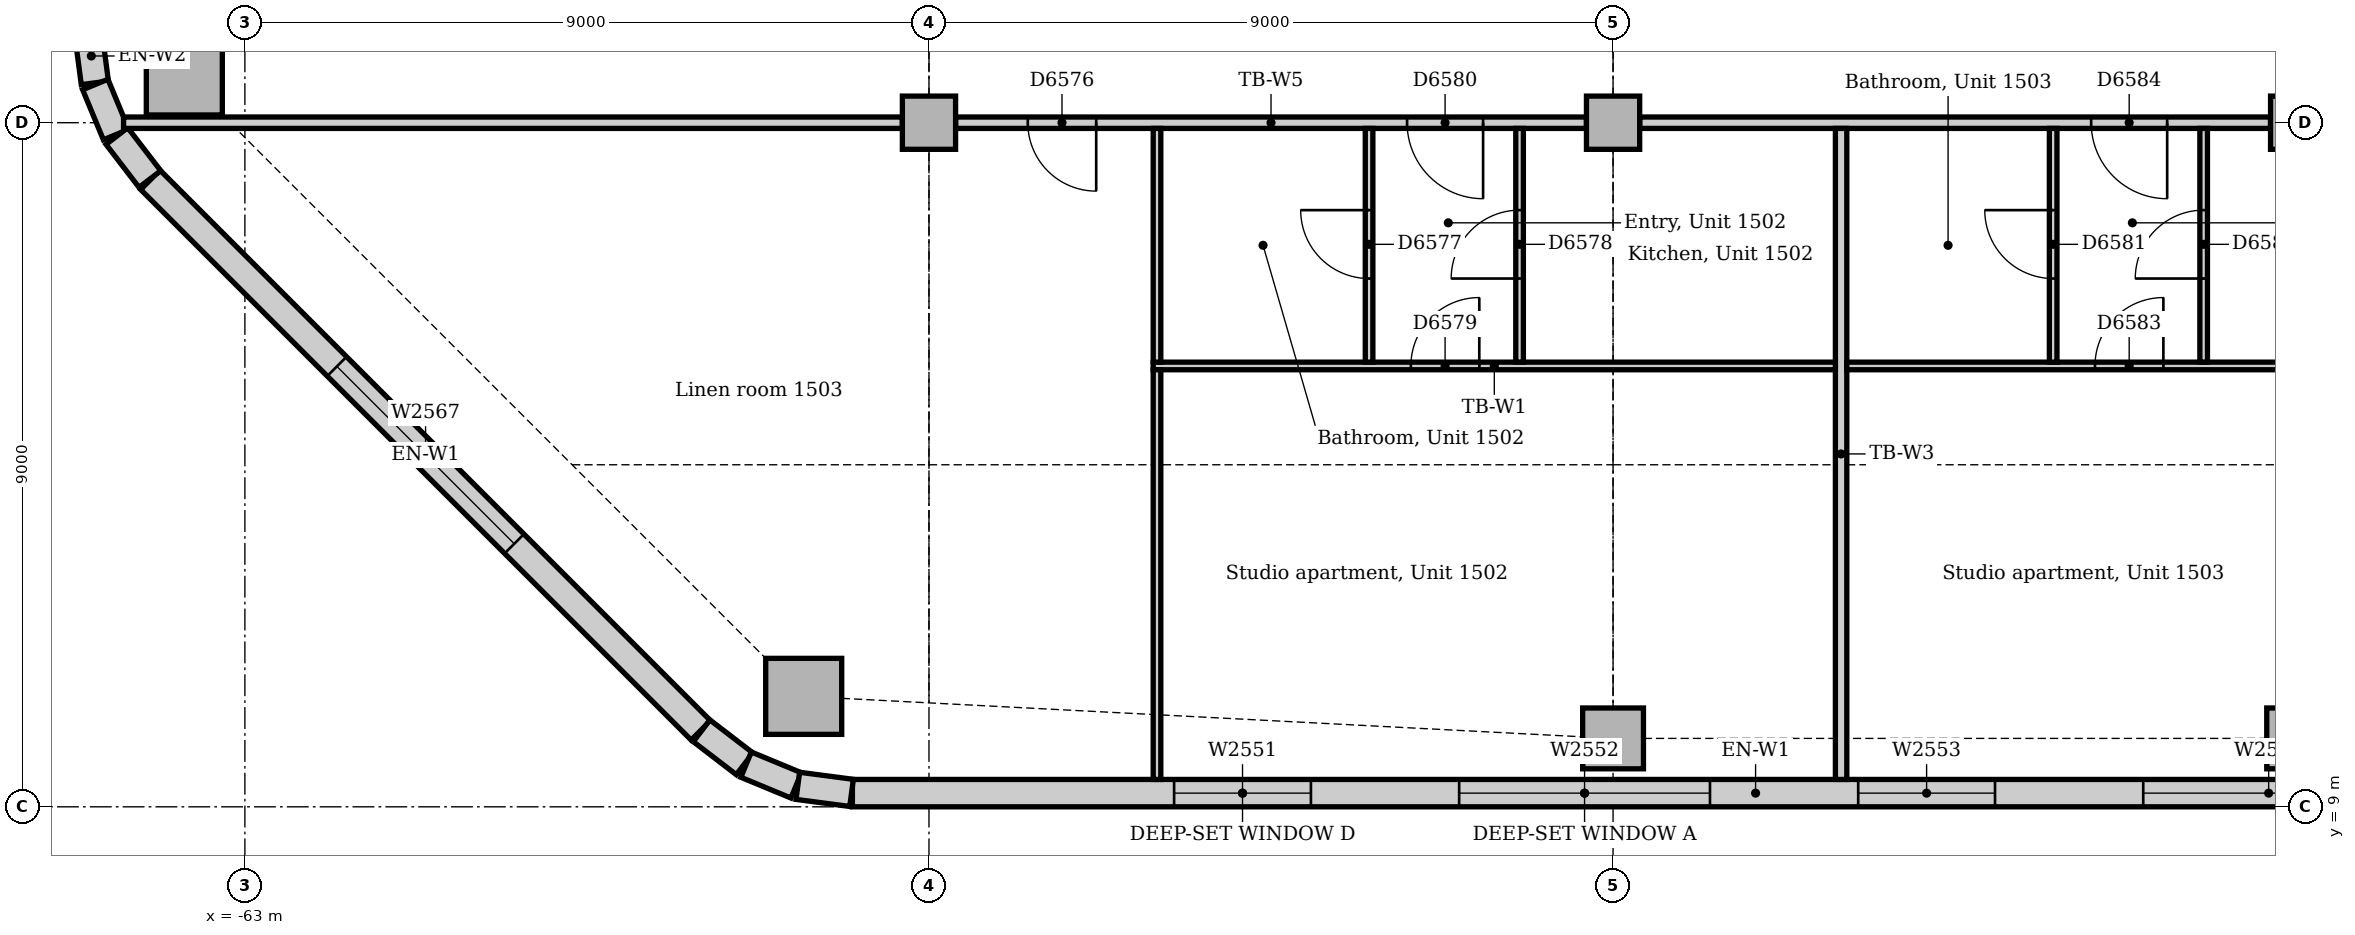
"""IFC4 building model, lengths in metres.
Left out: names, types, materials, properties, quantities, classifications, styles, units other than length and angle.
Written with IfcOpenShell. Run it as: python <this file> out.ifc"""

import sys

from ifc_helpers import new_model, si_unit, direction, frame, frame_2d, origin, origin_2d, place, context, subcontext, project, spatial, rectangle, extrude, element, fill, save


model = new_model("IFC4")
c1 = context("Model", 3, precision=1e-05, world=origin(), true_north=direction((0.0, 1.0)))
c2 = subcontext(c1, "Body", "Model", "MODEL_VIEW")
j1 = project(units=[si_unit("LENGTHUNIT", "METRE"), si_unit("PLANEANGLEUNIT", "RADIAN")], contexts=[c1])
p1 = place(None, origin())
s1 = spatial("IfcSite", under=j1, at=p1, CompositionType="ELEMENT")
p2 = place(p1, origin())
s2 = spatial("IfcBuilding", under=s1, at=p2, CompositionType="ELEMENT")
p3 = place(p2, frame((0.0, 0.0, 67.0)))
s3 = spatial("IfcBuildingStorey", under=s2, at=p3, CompositionType="ELEMENT", Elevation=67.0)
for number, where, z_axis, x_axis in (
    (1, (-55.648, 10.453, 0.0), (0.0, 0.0, 1.0), (1.0, 0.0, 0.0)),
    (2, (-63.797, 18.602, 0.0), (0.0, 0.0, 1.0), (1.0, 0.0, 0.0)),
):
    element("IfcColumn", number, at=place(p3, frame(where, z_axis=z_axis, x_axis=x_axis)), inside=s3, PredefinedType="COLUMN", context=c2, shape_type="SweptSolid", body=[
        extrude(rectangle(XDim=1.0, YDim=1.0, at=origin_2d()), origin(), (0.0, 0.0, 1.0), 3.85),
    ])
for number, where, z_axis, x_axis in (
    (3, (-45.0, 9.9, 0.0), (0.0, 0.0, 1.0), (1.0, 0.0, 0.0)),
    (4, (-36.0, 9.9, 0.0), (0.0, 0.0, 1.0), (1.0, 0.0, 0.0)),
):
    element("IfcColumn", number, at=place(p3, frame(where, z_axis=z_axis, x_axis=x_axis)), inside=s3, PredefinedType="COLUMN", context=c2, shape_type="SweptSolid", body=[
        extrude(rectangle(XDim=0.8, YDim=0.8, at=origin_2d()), origin(), (0.0, 0.0, 1.0), 3.85),
    ])
for number, where, z_axis, x_axis in (
    (5, (-54.0, 18.0, 0.0), (0.0, 0.0, 1.0), (1.0, 0.0, 0.0)),
    (6, (-45.0, 18.0, 0.0), (0.0, 0.0, 1.0), (1.0, 0.0, 0.0)),
    (7, (-36.0, 18.0, 0.0), (0.0, 0.0, 1.0), (1.0, 0.0, 0.0)),
):
    element("IfcColumn", number, at=place(p3, frame(where, z_axis=z_axis, x_axis=x_axis)), inside=s3, PredefinedType="COLUMN", context=c2, shape_type="SweptSolid", body=[
        extrude(rectangle(XDim=0.7, YDim=0.7, at=origin_2d()), origin(), (0.0, 0.0, 1.0), 3.85),
    ])
p4 = place(p3, frame((-55.007, 9.18, 0.0), z_axis=(0.0, 0.0, 1.0), x_axis=(1.0, 0.0, 0.0)))
e8 = element("IfcWall", 8, at=p4, inside=s3, PredefinedType="STANDARD", context=c2, shape_type="SweptSolid", body=[
    extrude(rectangle(XDim=23.765, YDim=0.36, at=frame_2d((11.882, 0.0))), origin(), (0.0, 0.0, 1.0), 3.85),
])
p5 = place(p4, frame((4.232, 0.0, 0.9)))
e9 = element("IfcOpeningElement", 9, at=p5, cuts=e8, PredefinedType="OPENING", context=c2, shape_type="SweptSolid", body=[
    extrude(rectangle(XDim=1.8, YDim=1.6, at=frame_2d((0.9, 0.8))), frame((0.0, 0.19, 0.0), z_axis=(0.0, -1.0, 0.0), x_axis=(1.0, 0.0, 0.0)), (0.0, 0.0, 1.0), 0.38),
])
p6 = place(p4, frame((7.982, 0.0, 0.9)))
e10 = element("IfcOpeningElement", 10, at=p6, cuts=e8, PredefinedType="OPENING", context=c2, shape_type="SweptSolid", body=[
    extrude(rectangle(XDim=3.3, YDim=1.6, at=frame_2d((1.65, 0.8))), frame((0.0, 0.19, 0.0), z_axis=(0.0, -1.0, 0.0), x_axis=(1.0, 0.0, 0.0)), (0.0, 0.0, 1.0), 0.38),
])
p7 = place(p4, frame((13.232, 0.0, 0.9)))
e11 = element("IfcOpeningElement", 11, at=p7, cuts=e8, PredefinedType="OPENING", context=c2, shape_type="SweptSolid", body=[
    extrude(rectangle(XDim=1.8, YDim=1.6, at=frame_2d((0.9, 0.8))), frame((0.0, 0.19, 0.0), z_axis=(0.0, -1.0, 0.0), x_axis=(1.0, 0.0, 0.0)), (0.0, 0.0, 1.0), 0.38),
])
p8 = place(p4, frame((16.982, 0.0, 0.9)))
e12 = element("IfcOpeningElement", 12, at=p8, cuts=e8, PredefinedType="OPENING", context=c2, shape_type="SweptSolid", body=[
    extrude(rectangle(XDim=3.3, YDim=1.6, at=frame_2d((1.65, 0.8))), frame((0.0, 0.19, 0.0), z_axis=(0.0, -1.0, 0.0), x_axis=(1.0, 0.0, 0.0)), (0.0, 0.0, 1.0), 0.38),
])
p9 = place(p3, frame((-64.244, 17.249, 0.0), z_axis=(0.0, 0.0, 1.0), x_axis=(0.707106781187, -0.707106781187, 0.0)))
e13 = element("IfcWall", 13, at=p9, inside=s3, PredefinedType="STANDARD", context=c2, shape_type="SweptSolid", body=[
    extrude(rectangle(XDim=10.243, YDim=0.36, at=frame_2d((5.121, 0.0))), origin(), (0.0, 0.0, 1.0), 3.85),
])
p10 = place(p9, frame((3.471, 0.0, 0.9)))
e14 = element("IfcOpeningElement", 14, at=p10, cuts=e13, PredefinedType="OPENING", context=c2, shape_type="SweptSolid", body=[
    extrude(rectangle(XDim=3.3, YDim=1.6, at=frame_2d((1.65, 0.8))), frame((0.0, 0.19, 0.0), z_axis=(0.0, -1.0, 0.0), x_axis=(1.0, 0.0, 0.0)), (0.0, 0.0, 1.0), 0.38),
])
for number, where, z_axis, x_axis in (
    (15, (-65.067, 19.231, 0.0), (0.0, 0.0, 1.0), (0.131, -0.991, 0.0)),
    (16, (-64.968, 18.503, 0.0), (0.0, 0.0, 1.0), (0.383, -0.924, 0.0)),
):
    element("IfcWall", number, at=place(p3, frame(where, z_axis=z_axis, x_axis=x_axis)), inside=s3, PredefinedType="STANDARD", context=c2, shape_type="SweptSolid", body=[
        extrude(rectangle(XDim=0.713, YDim=0.36, at=frame_2d((0.356, 0.0))), origin(), (0.0, 0.0, 1.0), 3.85),
    ])
for number, where, z_axis, x_axis in (
    (17, (-64.684, 17.825, 0.0), (0.0, 0.0, 1.0), (0.609, -0.793, 0.0)),
    (18, (-56.991, 10.0, 0.0), (0.0, 0.0, 1.0), (0.793, -0.609, 0.0)),
):
    element("IfcWall", number, at=place(p3, frame(where, z_axis=z_axis, x_axis=x_axis)), inside=s3, PredefinedType="STANDARD", context=c2, shape_type="SweptSolid", body=[
        extrude(rectangle(XDim=0.713, YDim=0.36, at=frame_2d((0.357, 0.0))), origin(), (0.0, 0.0, 1.0), 3.85),
    ])
for number, where, z_axis, x_axis in (
    (19, (-56.406, 9.555, 0.0), (0.0, 0.0, 1.0), (0.924, -0.383, 0.0)),
    (20, (-55.726, 9.276, 0.0), (0.0, 0.0, 1.0), (0.991, -0.131, 0.0)),
):
    element("IfcWall", number, at=place(p3, frame(where, z_axis=z_axis, x_axis=x_axis)), inside=s3, PredefinedType="STANDARD", context=c2, shape_type="SweptSolid", body=[
        extrude(rectangle(XDim=0.713, YDim=0.36, at=frame_2d((0.356, 0.0))), origin(), (0.0, 0.0, 1.0), 3.85),
    ])
p11 = place(p3, frame((-44.65, 18.0, 0.0), z_axis=(0.0, 0.0, 1.0), x_axis=(1.0, 0.0, 0.0)))
e21 = element("IfcWall", 21, at=p11, inside=s3, PredefinedType="PARTITIONING", context=c2, shape_type="SweptSolid", body=[
    extrude(rectangle(XDim=8.3, YDim=0.15, at=frame_2d((4.15, 0.0))), origin(), (0.0, 0.0, 1.0), 3.158),
])
p12 = place(p11, frame((5.94, 0.0, 0.0)))
e22 = element("IfcOpeningElement", 22, at=p12, cuts=e21, PredefinedType="OPENING", context=c2, shape_type="SweptSolid", body=[
    extrude(rectangle(XDim=1.0, YDim=2.1, at=frame_2d((0.5, 1.05))), frame((0.0, 0.085, 0.0), z_axis=(0.0, -1.0, 0.0), x_axis=(1.0, 0.0, 0.0)), (0.0, 0.0, 1.0), 0.17),
])
p13 = place(p3, frame((-53.65, 18.0, 0.0), z_axis=(0.0, 0.0, 1.0), x_axis=(1.0, 0.0, 0.0)))
e23 = element("IfcWall", 23, at=p13, inside=s3, PredefinedType="PARTITIONING", context=c2, shape_type="SweptSolid", body=[
    extrude(rectangle(XDim=8.3, YDim=0.15, at=frame_2d((4.15, 0.0))), origin(), (0.0, 0.0, 1.0), 3.158),
])
p14 = place(p13, frame((0.95, 0.0, 0.0)))
e24 = element("IfcOpeningElement", 24, at=p14, cuts=e23, PredefinedType="OPENING", context=c2, shape_type="SweptSolid", body=[
    extrude(rectangle(XDim=0.9, YDim=2.1, at=frame_2d((0.45, 1.05))), frame((0.0, 0.085, 0.0), z_axis=(0.0, -1.0, 0.0), x_axis=(1.0, 0.0, 0.0)), (0.0, 0.0, 1.0), 0.17),
])
p15 = place(p13, frame((5.94, 0.0, 0.0)))
e25 = element("IfcOpeningElement", 25, at=p15, cuts=e23, PredefinedType="OPENING", context=c2, shape_type="SweptSolid", body=[
    extrude(rectangle(XDim=1.0, YDim=2.1, at=frame_2d((0.5, 1.05))), frame((0.0, 0.085, 0.0), z_axis=(0.0, -1.0, 0.0), x_axis=(1.0, 0.0, 0.0)), (0.0, 0.0, 1.0), 0.17),
])
p16 = place(p3, frame((-64.596, 18.0, 0.0), z_axis=(0.0, 0.0, 1.0), x_axis=(1.0, 0.0, 0.0)))
e26 = element("IfcWall", 26, at=p16, inside=s3, PredefinedType="PARTITIONING", context=c2, shape_type="SweptSolid", body=[
    extrude(rectangle(XDim=10.246, YDim=0.15, at=frame_2d((5.123, 0.0))), origin(), (0.0, 0.0, 1.0), 3.158),
])
p17 = place(p3, frame((-42.0, 9.36, 0.0), z_axis=(0.0, 0.0, 1.0), x_axis=(0.0, 1.0, 0.0)))
e27 = element("IfcWall", 27, at=p17, inside=s3, PredefinedType="PARTITIONING", context=c2, shape_type="SweptSolid", body=[
    extrude(rectangle(XDim=8.565, YDim=0.15, at=frame_2d((4.282, 0.0))), origin(), (0.0, 0.0, 1.0), 3.85),
])
p18 = place(p3, frame((-51.05, 14.8, 0.0), z_axis=(0.0, 0.0, 1.0), x_axis=(1.0, 0.0, 0.0)))
e28 = element("IfcWall", 28, at=p18, inside=s3, PredefinedType="PARTITIONING", context=c2, shape_type="SweptSolid", body=[
    extrude(rectangle(XDim=8.975, YDim=0.1, at=frame_2d((4.487, 0.0))), origin(), (0.0, 0.0, 1.0), 3.85),
])
p19 = place(p18, frame((3.39, 0.0, 0.0)))
e29 = element("IfcOpeningElement", 29, at=p19, cuts=e28, PredefinedType="OPENING", context=c2, shape_type="SweptSolid", body=[
    extrude(rectangle(XDim=0.9, YDim=2.1, at=frame_2d((0.45, 1.05))), frame((0.0, 0.06, 0.0), z_axis=(0.0, -1.0, 0.0), x_axis=(1.0, 0.0, 0.0)), (0.0, 0.0, 1.0), 0.12),
])
p20 = place(p3, frame((-41.925, 14.8, 0.0), z_axis=(0.0, 0.0, 1.0), x_axis=(1.0, 0.0, 0.0)))
e30 = element("IfcWall", 30, at=p20, inside=s3, PredefinedType="PARTITIONING", context=c2, shape_type="SweptSolid", body=[
    extrude(rectangle(XDim=8.975, YDim=0.1, at=frame_2d((4.487, 0.0))), origin(), (0.0, 0.0, 1.0), 3.85),
])
p21 = place(p20, frame((3.265, 0.0, 0.0)))
e31 = element("IfcOpeningElement", 31, at=p21, cuts=e30, PredefinedType="OPENING", context=c2, shape_type="SweptSolid", body=[
    extrude(rectangle(XDim=0.9, YDim=2.1, at=frame_2d((0.45, 1.05))), frame((0.0, 0.06, 0.0), z_axis=(0.0, -1.0, 0.0), x_axis=(1.0, 0.0, 0.0)), (0.0, 0.0, 1.0), 0.12),
])
p22 = place(p3, frame((-51.0, 14.85, 0.0), z_axis=(0.0, 0.0, 1.0), x_axis=(0.0, 1.0, 0.0)))
e32 = element("IfcWall", 32, at=p22, inside=s3, PredefinedType="PARTITIONING", context=c2, shape_type="SweptSolid", body=[
    extrude(rectangle(XDim=3.075, YDim=0.1, at=frame_2d((1.538, 0.0))), origin(), (0.0, 0.0, 1.0), 3.85),
])
p23 = place(p3, frame((-51.0, 9.36, 0.0), z_axis=(0.0, 0.0, 1.0), x_axis=(0.0, 1.0, 0.0)))
e33 = element("IfcWall", 33, at=p23, inside=s3, PredefinedType="PARTITIONING", context=c2, shape_type="SweptSolid", body=[
    extrude(rectangle(XDim=5.39, YDim=0.1, at=frame_2d((2.695, 0.0))), origin(), (0.0, 0.0, 1.0), 3.85),
])
p24 = place(p3, frame((-48.21, 14.85, 0.0), z_axis=(0.0, 0.0, 1.0), x_axis=(0.0, 1.0, 0.0)))
e34 = element("IfcWall", 34, at=p24, inside=s3, PredefinedType="PARTITIONING", context=c2, shape_type="SweptSolid", body=[
    extrude(rectangle(XDim=3.075, YDim=0.1, at=frame_2d((1.538, 0.0))), origin(), (0.0, 0.0, 1.0), 3.85),
])
p25 = place(p24, frame((1.1, 0.0, 0.0)))
e35 = element("IfcOpeningElement", 35, at=p25, cuts=e34, PredefinedType="OPENING", context=c2, shape_type="SweptSolid", body=[
    extrude(rectangle(XDim=0.9, YDim=2.1, at=frame_2d((0.45, 1.05))), frame((0.0, 0.06, 0.0), z_axis=(0.0, -1.0, 0.0), x_axis=(1.0, 0.0, 0.0)), (0.0, 0.0, 1.0), 0.12),
])
p26 = place(p3, frame((-46.23, 14.85, 0.0), z_axis=(0.0, 0.0, 1.0), x_axis=(0.0, 1.0, 0.0)))
e36 = element("IfcWall", 36, at=p26, inside=s3, PredefinedType="PARTITIONING", context=c2, shape_type="SweptSolid", body=[
    extrude(rectangle(XDim=3.075, YDim=0.1, at=frame_2d((1.538, 0.0))), origin(), (0.0, 0.0, 1.0), 3.85),
])
p27 = place(p26, frame((1.1, 0.0, 0.0)))
e37 = element("IfcOpeningElement", 37, at=p27, cuts=e36, PredefinedType="OPENING", context=c2, shape_type="SweptSolid", body=[
    extrude(rectangle(XDim=0.9, YDim=2.1, at=frame_2d((0.45, 1.05))), frame((0.0, 0.06, 0.0), z_axis=(0.0, -1.0, 0.0), x_axis=(1.0, 0.0, 0.0)), (0.0, 0.0, 1.0), 0.12),
])
p28 = place(p3, frame((-39.21, 14.85, 0.0), z_axis=(0.0, 0.0, 1.0), x_axis=(0.0, 1.0, 0.0)))
e38 = element("IfcWall", 38, at=p28, inside=s3, PredefinedType="PARTITIONING", context=c2, shape_type="SweptSolid", body=[
    extrude(rectangle(XDim=3.075, YDim=0.1, at=frame_2d((1.538, 0.0))), origin(), (0.0, 0.0, 1.0), 3.85),
])
p29 = place(p28, frame((1.1, 0.0, 0.0)))
e39 = element("IfcOpeningElement", 39, at=p29, cuts=e38, PredefinedType="OPENING", context=c2, shape_type="SweptSolid", body=[
    extrude(rectangle(XDim=0.9, YDim=2.1, at=frame_2d((0.45, 1.05))), frame((0.0, 0.06, 0.0), z_axis=(0.0, -1.0, 0.0), x_axis=(1.0, 0.0, 0.0)), (0.0, 0.0, 1.0), 0.12),
])
p30 = place(p3, frame((-37.23, 14.85, 0.0), z_axis=(0.0, 0.0, 1.0), x_axis=(0.0, 1.0, 0.0)))
e40 = element("IfcWall", 40, at=p30, inside=s3, PredefinedType="PARTITIONING", context=c2, shape_type="SweptSolid", body=[
    extrude(rectangle(XDim=3.075, YDim=0.1, at=frame_2d((1.538, 0.0))), origin(), (0.0, 0.0, 1.0), 3.85),
])
p31 = place(p30, frame((1.1, 0.0, 0.0)))
e41 = element("IfcOpeningElement", 41, at=p31, cuts=e40, PredefinedType="OPENING", context=c2, shape_type="SweptSolid", body=[
    extrude(rectangle(XDim=0.9, YDim=2.1, at=frame_2d((0.45, 1.05))), frame((0.0, 0.06, 0.0), z_axis=(0.0, -1.0, 0.0), x_axis=(1.0, 0.0, 0.0)), (0.0, 0.0, 1.0), 0.12),
])
p32 = place(p5, origin())
e42 = element("IfcWindow", 42, at=p32, inside=s3, PartitioningType="SINGLE_PANEL", PredefinedType="WINDOW", context=c2, shape_type="SweptSolid", body=[
    extrude(rectangle(XDim=1.8, YDim=1.6, at=frame_2d((0.9, 0.8))), frame((0.0, 0.13, 0.0), z_axis=(0.0, -1.0, 0.0), x_axis=(1.0, 0.0, 0.0)), (0.0, 0.0, 1.0), 0.06),
])
fill(e9, e42)
p33 = place(p6, origin())
e43 = element("IfcWindow", 43, at=p33, inside=s3, PartitioningType="SINGLE_PANEL", PredefinedType="WINDOW", context=c2, shape_type="SweptSolid", body=[
    extrude(rectangle(XDim=3.3, YDim=1.6, at=frame_2d((1.65, 0.8))), frame((0.0, 0.13, 0.0), z_axis=(0.0, -1.0, 0.0), x_axis=(1.0, 0.0, 0.0)), (0.0, 0.0, 1.0), 0.06),
])
fill(e10, e43)
p34 = place(p7, origin())
e44 = element("IfcWindow", 44, at=p34, inside=s3, PartitioningType="SINGLE_PANEL", PredefinedType="WINDOW", context=c2, shape_type="SweptSolid", body=[
    extrude(rectangle(XDim=1.8, YDim=1.6, at=frame_2d((0.9, 0.8))), frame((0.0, 0.13, 0.0), z_axis=(0.0, -1.0, 0.0), x_axis=(1.0, 0.0, 0.0)), (0.0, 0.0, 1.0), 0.06),
])
fill(e11, e44)
p35 = place(p8, origin())
e45 = element("IfcWindow", 45, at=p35, inside=s3, PartitioningType="SINGLE_PANEL", PredefinedType="WINDOW", context=c2, shape_type="SweptSolid", body=[
    extrude(rectangle(XDim=3.3, YDim=1.6, at=frame_2d((1.65, 0.8))), frame((0.0, 0.13, 0.0), z_axis=(0.0, -1.0, 0.0), x_axis=(1.0, 0.0, 0.0)), (0.0, 0.0, 1.0), 0.06),
])
fill(e12, e45)
p36 = place(p10, origin())
e46 = element("IfcWindow", 46, at=p36, inside=s3, PartitioningType="SINGLE_PANEL", PredefinedType="WINDOW", context=c2, shape_type="SweptSolid", body=[
    extrude(rectangle(XDim=3.3, YDim=1.6, at=frame_2d((1.65, 0.8))), frame((0.0, 0.13, 0.0), z_axis=(0.0, -1.0, 0.0), x_axis=(1.0, 0.0, 0.0)), (0.0, 0.0, 1.0), 0.06),
])
fill(e14, e46)
p37 = place(p14, frame((0.9, 0.0, 0.0), z_axis=(0.0, 0.0, 1.0), x_axis=(-1.0, 0.0, 0.0)))
e47 = element("IfcDoor", 47, at=p37, inside=s3, OperationType="SINGLE_SWING_LEFT", PredefinedType="DOOR", context=c2, shape_type="SweptSolid", body=[
    extrude(rectangle(XDim=0.9, YDim=2.1, at=frame_2d((0.45, 1.05))), frame((0.0, 0.025, 0.0), z_axis=(0.0, -1.0, 0.0), x_axis=(1.0, 0.0, 0.0)), (0.0, 0.0, 1.0), 0.05),
])
fill(e24, e47)
p38 = place(p25, origin())
e48 = element("IfcDoor", 48, at=p38, inside=s3, OperationType="SINGLE_SWING_RIGHT", PredefinedType="DOOR", context=c2, shape_type="SweptSolid", body=[
    extrude(rectangle(XDim=0.9, YDim=2.1, at=frame_2d((0.45, 1.05))), frame((0.0, 0.025, 0.0), z_axis=(0.0, -1.0, 0.0), x_axis=(1.0, 0.0, 0.0)), (0.0, 0.0, 1.0), 0.05),
])
fill(e35, e48)
p39 = place(p27, origin())
e49 = element("IfcDoor", 49, at=p39, inside=s3, OperationType="SINGLE_SWING_LEFT", PredefinedType="DOOR", context=c2, shape_type="SweptSolid", body=[
    extrude(rectangle(XDim=0.9, YDim=2.1, at=frame_2d((0.45, 1.05))), frame((0.0, 0.025, 0.0), z_axis=(0.0, -1.0, 0.0), x_axis=(1.0, 0.0, 0.0)), (0.0, 0.0, 1.0), 0.05),
])
fill(e37, e49)
p40 = place(p19, origin())
e50 = element("IfcDoor", 50, at=p40, inside=s3, OperationType="SINGLE_SWING_RIGHT", PredefinedType="DOOR", context=c2, shape_type="SweptSolid", body=[
    extrude(rectangle(XDim=0.9, YDim=2.1, at=frame_2d((0.45, 1.05))), frame((0.0, 0.025, 0.0), z_axis=(0.0, -1.0, 0.0), x_axis=(1.0, 0.0, 0.0)), (0.0, 0.0, 1.0), 0.05),
])
fill(e29, e50)
p41 = place(p15, frame((1.0, 0.0, 0.0), z_axis=(0.0, 0.0, 1.0), x_axis=(-1.0, 0.0, 0.0)))
e51 = element("IfcDoor", 51, at=p41, inside=s3, OperationType="SINGLE_SWING_LEFT", PredefinedType="DOOR", context=c2, shape_type="SweptSolid", body=[
    extrude(rectangle(XDim=1.0, YDim=2.1, at=frame_2d((0.5, 1.05))), frame((0.0, 0.025, 0.0), z_axis=(0.0, -1.0, 0.0), x_axis=(1.0, 0.0, 0.0)), (0.0, 0.0, 1.0), 0.05),
])
fill(e25, e51)
p42 = place(p29, origin())
e52 = element("IfcDoor", 52, at=p42, inside=s3, OperationType="SINGLE_SWING_RIGHT", PredefinedType="DOOR", context=c2, shape_type="SweptSolid", body=[
    extrude(rectangle(XDim=0.9, YDim=2.1, at=frame_2d((0.45, 1.05))), frame((0.0, 0.025, 0.0), z_axis=(0.0, -1.0, 0.0), x_axis=(1.0, 0.0, 0.0)), (0.0, 0.0, 1.0), 0.05),
])
fill(e39, e52)
p43 = place(p31, origin())
e53 = element("IfcDoor", 53, at=p43, inside=s3, OperationType="SINGLE_SWING_LEFT", PredefinedType="DOOR", context=c2, shape_type="SweptSolid", body=[
    extrude(rectangle(XDim=0.9, YDim=2.1, at=frame_2d((0.45, 1.05))), frame((0.0, 0.025, 0.0), z_axis=(0.0, -1.0, 0.0), x_axis=(1.0, 0.0, 0.0)), (0.0, 0.0, 1.0), 0.05),
])
fill(e41, e53)
p44 = place(p21, origin())
e54 = element("IfcDoor", 54, at=p44, inside=s3, OperationType="SINGLE_SWING_RIGHT", PredefinedType="DOOR", context=c2, shape_type="SweptSolid", body=[
    extrude(rectangle(XDim=0.9, YDim=2.1, at=frame_2d((0.45, 1.05))), frame((0.0, 0.025, 0.0), z_axis=(0.0, -1.0, 0.0), x_axis=(1.0, 0.0, 0.0)), (0.0, 0.0, 1.0), 0.05),
])
fill(e31, e54)
p45 = place(p12, frame((1.0, 0.0, 0.0), z_axis=(0.0, 0.0, 1.0), x_axis=(-1.0, 0.0, 0.0)))
e55 = element("IfcDoor", 55, at=p45, inside=s3, OperationType="SINGLE_SWING_LEFT", PredefinedType="DOOR", context=c2, shape_type="SweptSolid", body=[
    extrude(rectangle(XDim=1.0, YDim=2.1, at=frame_2d((0.5, 1.05))), frame((0.0, 0.025, 0.0), z_axis=(0.0, -1.0, 0.0), x_axis=(1.0, 0.0, 0.0)), (0.0, 0.0, 1.0), 0.05),
])
fill(e22, e55)
save(model, sys.argv[1])
